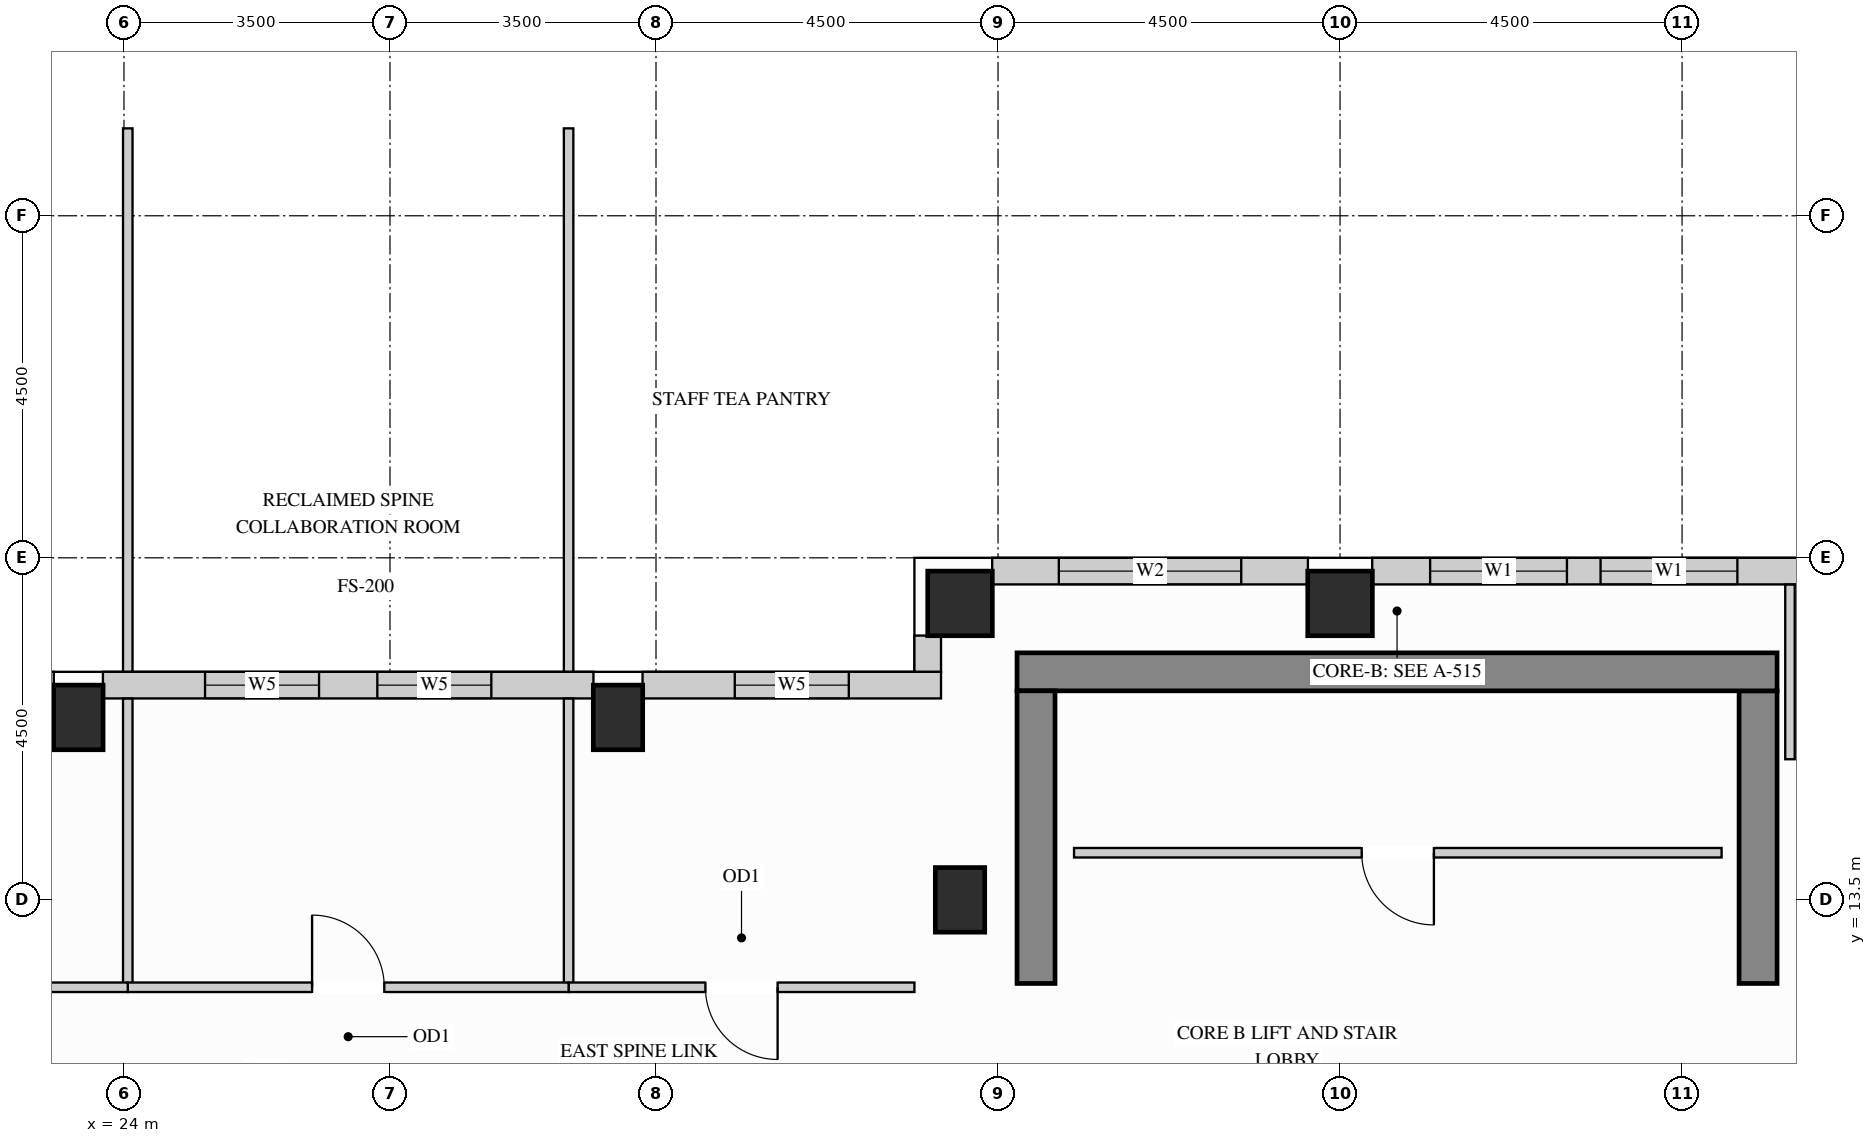
"""IFC4 building model, lengths in metres.
Left out: names, types, materials, properties, quantities, classifications, styles, units other than length and angle.
Written with IfcOpenShell. Run it as: python <this file> out.ifc"""

import sys

from ifc_helpers import new_model, si_unit, direction, frame, frame_2d, origin, origin_2d, place, context, subcontext, project, spatial, rectangle, extrude, source, transform, mapped, element, fill, save


model = new_model("IFC4")
c1 = context("Model", 3, precision=1e-05, world=origin(), true_north=direction((0.0, 1.0)))
c2 = subcontext(c1, "Body", "Model", "MODEL_VIEW")
j1 = project(units=[si_unit("LENGTHUNIT", "METRE"), si_unit("PLANEANGLEUNIT", "RADIAN")], contexts=[c1])
p1 = place(None, origin())
s1 = spatial("IfcSite", under=j1, at=p1, CompositionType="ELEMENT")
p2 = place(p1, origin())
s2 = spatial("IfcBuilding", under=s1, at=p2, CompositionType="ELEMENT")
p3 = place(p2, frame((0.0, 0.0, 234.0)))
s3 = spatial("IfcBuildingStorey", under=s2, at=p3, CompositionType="ELEMENT", Elevation=234.0)
m1 = source(origin(), c2, "Body", "SweptSolid", [
    extrude(rectangle(XDim=0.65, YDim=0.85, at=origin_2d()), origin(), (0.0, 0.0, 1.0), 3.4),
])
for number, where, z_axis, x_axis in (
    (1, (35.0, 13.5, 0.0), (0.0, 0.0, 1.0), (1.0, 0.0, 0.0)),
    (2, (23.4, 15.9, 0.0), (0.0, 0.0, 1.0), (1.0, 0.0, 0.0)),
    (3, (30.5, 15.9, 0.0), (0.0, 0.0, 1.0), (1.0, 0.0, 0.0)),
):
    element("IfcColumn", number, at=place(p3, frame(where, z_axis=z_axis, x_axis=x_axis)), inside=s3, PredefinedType="COLUMN", context=c2, shape_type="MappedRepresentation", body=[
        mapped(m1, transform((0.0, 0.0, 0.0), x_axis=(1.0, 0.0, 0.0), y_axis=(0.0, 1.0, 0.0), z_axis=(0.0, 0.0, 1.0))),
    ])
m2 = source(origin(), c2, "Body", "SweptSolid", [
    extrude(rectangle(XDim=0.85, YDim=0.85, at=origin_2d()), origin(), (0.0, 0.0, 1.0), 3.4),
])
for number, where, z_axis, x_axis in (
    (4, (35.0, 17.4, 0.0), (0.0, 0.0, 1.0), (1.0, 0.0, 0.0)),
    (5, (40.0, 17.4, 0.0), (0.0, 0.0, 1.0), (1.0, 0.0, 0.0)),
):
    element("IfcColumn", number, at=place(p3, frame(where, z_axis=z_axis, x_axis=x_axis)), inside=s3, PredefinedType="COLUMN", context=c2, shape_type="MappedRepresentation", body=[
        mapped(m2, transform((0.0, 0.0, 0.0), x_axis=(1.0, 0.0, 0.0), y_axis=(0.0, 1.0, 0.0), z_axis=(0.0, 0.0, 1.0))),
    ])
m3 = source(origin(), c2, "Body", "SweptSolid", [
    extrude(rectangle(XDim=3.85, YDim=0.5, at=frame_2d((1.925, 0.0))), origin(), (0.0, 0.0, 1.0), 3.4),
])
p4 = place(p3, frame((45.5, 12.4, 0.0), z_axis=(0.0, 0.0, 1.0), x_axis=(0.0, 1.0, 0.0)))
e6 = element("IfcWall", 6, at=p4, inside=s3, PredefinedType="SHEAR", context=c2, shape_type="MappedRepresentation", body=[
    mapped(m3, transform((0.0, 0.0, 0.0), x_axis=(1.0, 0.0, 0.0), y_axis=(0.0, 1.0, 0.0), z_axis=(0.0, 0.0, 1.0))),
])
m4 = source(origin(), c2, "Body", "SweptSolid", [
    extrude(rectangle(XDim=10.0, YDim=0.5, at=frame_2d((5.0, 0.0))), origin(), (0.0, 0.0, 1.0), 3.4),
])
p5 = place(p3, frame((35.75, 16.5, 0.0), z_axis=(0.0, 0.0, 1.0), x_axis=(1.0, 0.0, 0.0)))
e7 = element("IfcWall", 7, at=p5, inside=s3, PredefinedType="SHEAR", context=c2, shape_type="MappedRepresentation", body=[
    mapped(m4, transform((0.0, 0.0, 0.0), x_axis=(1.0, 0.0, 0.0), y_axis=(0.0, 1.0, 0.0), z_axis=(0.0, 0.0, 1.0))),
])
p6 = place(p3, frame((36.0, 12.4, 0.0), z_axis=(0.0, 0.0, 1.0), x_axis=(0.0, 1.0, 0.0)))
e8 = element("IfcWall", 8, at=p6, inside=s3, PredefinedType="SHEAR", context=c2, shape_type="MappedRepresentation", body=[
    mapped(m3, transform((0.0, 0.0, 0.0), x_axis=(1.0, 0.0, 0.0), y_axis=(0.0, 1.0, 0.0), z_axis=(0.0, 0.0, 1.0))),
])
p7 = place(p3, frame((47.5, 17.825, 0.0), z_axis=(0.0, 0.0, 1.0), x_axis=(-1.0, 0.0, 0.0)))
e9 = element("IfcWall", 9, at=p7, inside=s3, PredefinedType="SOLIDWALL", context=c2, shape_type="SweptSolid", body=[
    extrude(rectangle(XDim=7.077, YDim=0.35, at=frame_2d((3.539, 0.0))), origin(), (0.0, 0.0, 1.0), 3.385),
])
p8 = place(p7, frame((2.272, 0.0, 0.78)))
e10 = element("IfcOpeningElement", 10, at=p8, cuts=e9, PredefinedType="OPENING", context=c2, shape_type="SweptSolid", body=[
    extrude(rectangle(XDim=1.8, YDim=2.1, at=frame_2d((0.9, 1.05))), frame((0.0, 0.185, 0.0), z_axis=(0.0, -1.0, 0.0), x_axis=(1.0, 0.0, 0.0)), (0.0, 0.0, 1.0), 0.37),
])
p9 = place(p7, frame((4.515, 0.0, 0.78)))
e11 = element("IfcOpeningElement", 11, at=p9, cuts=e9, PredefinedType="OPENING", context=c2, shape_type="SweptSolid", body=[
    extrude(rectangle(XDim=1.8, YDim=2.1, at=frame_2d((0.9, 1.05))), frame((0.0, 0.185, 0.0), z_axis=(0.0, -1.0, 0.0), x_axis=(1.0, 0.0, 0.0)), (0.0, 0.0, 1.0), 0.37),
])
p10 = place(p3, frame((39.577, 17.825, 0.0), z_axis=(0.0, 0.0, 1.0), x_axis=(-1.0, 0.0, 0.0)))
e12 = element("IfcWall", 12, at=p10, inside=s3, PredefinedType="SOLIDWALL", context=c2, shape_type="SweptSolid", body=[
    extrude(rectangle(XDim=4.154, YDim=0.35, at=frame_2d((2.077, 0.0))), origin(), (0.0, 0.0, 1.0), 3.385),
])
p11 = place(p10, frame((0.877, 0.0, 0.78)))
e13 = element("IfcOpeningElement", 13, at=p11, cuts=e12, PredefinedType="OPENING", context=c2, shape_type="SweptSolid", body=[
    extrude(rectangle(XDim=2.4, YDim=2.1, at=frame_2d((1.2, 1.05))), frame((0.0, 0.185, 0.0), z_axis=(0.0, -1.0, 0.0), x_axis=(1.0, 0.0, 0.0)), (0.0, 0.0, 1.0), 0.37),
])
m5 = source(origin(), c2, "Body", "SweptSolid", [
    extrude(rectangle(XDim=0.479, YDim=0.35, at=frame_2d((0.24, 0.0))), origin(), (0.0, 0.0, 1.0), 3.385),
])
p12 = place(p3, frame((34.575, 16.977, 0.0), z_axis=(0.0, 0.0, 1.0), x_axis=(0.0, -1.0, 0.0)))
e14 = element("IfcWall", 14, at=p12, inside=s3, PredefinedType="SOLIDWALL", context=c2, shape_type="MappedRepresentation", body=[
    mapped(m5, transform((0.0, 0.0, 0.0), x_axis=(1.0, 0.0, 0.0), y_axis=(0.0, 1.0, 0.0), z_axis=(0.0, 0.0, 1.0))),
])
p13 = place(p3, frame((34.75, 16.325, 0.0), z_axis=(0.0, 0.0, 1.0), x_axis=(-1.0, 0.0, 0.0)))
e15 = element("IfcWall", 15, at=p13, inside=s3, PredefinedType="SOLIDWALL", context=c2, shape_type="SweptSolid", body=[
    extrude(rectangle(XDim=3.927, YDim=0.35, at=frame_2d((1.963, 0.0))), origin(), (0.0, 0.0, 1.0), 3.385),
])
p14 = place(p13, frame((1.213, 0.0, 0.78)))
e16 = element("IfcOpeningElement", 16, at=p14, cuts=e15, PredefinedType="OPENING", context=c2, shape_type="SweptSolid", body=[
    extrude(rectangle(XDim=1.5, YDim=2.0, at=frame_2d((0.75, 1.0))), frame((0.0, 0.185, 0.0), z_axis=(0.0, -1.0, 0.0), x_axis=(1.0, 0.0, 0.0)), (0.0, 0.0, 1.0), 0.37),
])
p15 = place(p3, frame((30.177, 16.325, 0.0), z_axis=(0.0, 0.0, 1.0), x_axis=(-1.0, 0.0, 0.0)))
e17 = element("IfcWall", 17, at=p15, inside=s3, PredefinedType="SOLIDWALL", context=c2, shape_type="SweptSolid", body=[
    extrude(rectangle(XDim=6.454, YDim=0.35, at=frame_2d((3.227, 0.0))), origin(), (0.0, 0.0, 1.0), 3.385),
])
p16 = place(p15, frame((1.344, 0.0, 0.78)))
e18 = element("IfcOpeningElement", 18, at=p16, cuts=e17, PredefinedType="OPENING", context=c2, shape_type="SweptSolid", body=[
    extrude(rectangle(XDim=1.5, YDim=2.0, at=frame_2d((0.75, 1.0))), frame((0.0, 0.185, 0.0), z_axis=(0.0, -1.0, 0.0), x_axis=(1.0, 0.0, 0.0)), (0.0, 0.0, 1.0), 0.37),
])
p17 = place(p15, frame((3.61, 0.0, 0.78)))
e19 = element("IfcOpeningElement", 19, at=p17, cuts=e17, PredefinedType="OPENING", context=c2, shape_type="SweptSolid", body=[
    extrude(rectangle(XDim=1.5, YDim=2.0, at=frame_2d((0.75, 1.0))), frame((0.0, 0.185, 0.0), z_axis=(0.0, -1.0, 0.0), x_axis=(1.0, 0.0, 0.0)), (0.0, 0.0, 1.0), 0.37),
])
p18 = place(p3, frame((23.077, 16.325, 0.0), z_axis=(0.0, 0.0, 1.0), x_axis=(-1.0, 0.0, 0.0)))
e20 = element("IfcWall", 20, at=p18, inside=s3, PredefinedType="SOLIDWALL", context=c2, shape_type="SweptSolid", body=[
    extrude(rectangle(XDim=3.927, YDim=0.35, at=frame_2d((1.963, 0.0))), origin(), (0.0, 0.0, 1.0), 3.385),
])
p19 = place(p18, frame((1.213, 0.0, 0.78)))
e21 = element("IfcOpeningElement", 21, at=p19, cuts=e20, PredefinedType="OPENING", context=c2, shape_type="SweptSolid", body=[
    extrude(rectangle(XDim=1.5, YDim=2.0, at=frame_2d((0.75, 1.0))), frame((0.0, 0.185, 0.0), z_axis=(0.0, -1.0, 0.0), x_axis=(1.0, 0.0, 0.0)), (0.0, 0.0, 1.0), 0.37),
])
p20 = place(p3, frame((36.5, 14.12, 0.0), z_axis=(0.0, 0.0, 1.0), x_axis=(1.0, 0.0, 0.0)))
e22 = element("IfcWall", 22, at=p20, inside=s3, PredefinedType="PARTITIONING", context=c2, shape_type="SweptSolid", body=[
    extrude(rectangle(XDim=8.52, YDim=0.125, at=frame_2d((4.26, 0.0))), origin(), (0.0, 0.0, 1.0), 3.385),
])
p21 = place(p20, frame((3.785, 0.0, 0.0)))
e23 = element("IfcOpeningElement", 23, at=p21, cuts=e22, PredefinedType="OPENING", context=c2, shape_type="SweptSolid", body=[
    extrude(rectangle(XDim=0.95, YDim=2.15, at=frame_2d((0.475, 1.075))), frame((0.0, 0.073, 0.0), z_axis=(0.0, -1.0, 0.0), x_axis=(1.0, 0.0, 0.0)), (0.0, 0.0, 1.0), 0.145),
])
m6 = source(origin(), c2, "Body", "SweptSolid", [
    extrude(rectangle(XDim=2.298, YDim=0.125, at=frame_2d((1.149, 0.0))), origin(), (0.0, 0.0, 1.0), 3.385),
])
p22 = place(p3, frame((45.92, 15.35, 0.0), z_axis=(0.0, 0.0, 1.0), x_axis=(0.0, 1.0, 0.0)))
e24 = element("IfcWall", 24, at=p22, inside=s3, PredefinedType="PARTITIONING", context=c2, shape_type="MappedRepresentation", body=[
    mapped(m6, transform((0.0, 0.0, 0.0), x_axis=(1.0, 0.0, 0.0), y_axis=(0.0, 1.0, 0.0), z_axis=(0.0, 0.0, 1.0))),
])
m7 = source(origin(), c2, "Body", "SweptSolid", [
    extrude(rectangle(XDim=3.798, YDim=0.125, at=frame_2d((1.899, 0.0))), origin(), (0.0, 0.0, 1.0), 3.385),
])
p23 = place(p3, frame((24.05, 12.35, 0.0), z_axis=(0.0, 0.0, 1.0), x_axis=(0.0, 1.0, 0.0)))
e25 = element("IfcWall", 25, at=p23, inside=s3, PredefinedType="PARTITIONING", context=c2, shape_type="MappedRepresentation", body=[
    mapped(m7, transform((0.0, 0.0, 0.0), x_axis=(1.0, 0.0, 0.0), y_axis=(0.0, 1.0, 0.0), z_axis=(0.0, 0.0, 1.0))),
])
m8 = source(origin(), c2, "Body", "SweptSolid", [
    extrude(rectangle(XDim=7.148, YDim=0.125, at=frame_2d((3.574, 0.0))), origin(), (0.0, 0.0, 1.0), 3.385),
])
p24 = place(p3, frame((24.05, 16.502, 0.0), z_axis=(0.0, 0.0, 1.0), x_axis=(0.0, 1.0, 0.0)))
e26 = element("IfcWall", 26, at=p24, inside=s3, PredefinedType="PARTITIONING", context=c2, shape_type="MappedRepresentation", body=[
    mapped(m8, transform((0.0, 0.0, 0.0), x_axis=(1.0, 0.0, 0.0), y_axis=(0.0, 1.0, 0.0), z_axis=(0.0, 0.0, 1.0))),
])
p25 = place(p3, frame((29.85, 12.35, 0.0), z_axis=(0.0, 0.0, 1.0), x_axis=(0.0, 1.0, 0.0)))
e27 = element("IfcWall", 27, at=p25, inside=s3, PredefinedType="PARTITIONING", context=c2, shape_type="MappedRepresentation", body=[
    mapped(m7, transform((0.0, 0.0, 0.0), x_axis=(1.0, 0.0, 0.0), y_axis=(0.0, 1.0, 0.0), z_axis=(0.0, 0.0, 1.0))),
])
p26 = place(p3, frame((29.85, 16.502, 0.0), z_axis=(0.0, 0.0, 1.0), x_axis=(0.0, 1.0, 0.0)))
e28 = element("IfcWall", 28, at=p26, inside=s3, PredefinedType="PARTITIONING", context=c2, shape_type="MappedRepresentation", body=[
    mapped(m8, transform((0.0, 0.0, 0.0), x_axis=(1.0, 0.0, 0.0), y_axis=(0.0, 1.0, 0.0), z_axis=(0.0, 0.0, 1.0))),
])
p27 = place(p3, frame((29.85, 12.35, 0.0), z_axis=(0.0, 0.0, 1.0), x_axis=(1.0, 0.0, 0.0)))
e29 = element("IfcWall", 29, at=p27, inside=s3, PredefinedType="PARTITIONING", context=c2, shape_type="SweptSolid", body=[
    extrude(rectangle(XDim=4.55, YDim=0.125, at=frame_2d((2.275, 0.0))), origin(), (0.0, 0.0, 1.0), 3.385),
])
p28 = place(p27, frame((1.8, 0.0, 0.0)))
e30 = element("IfcOpeningElement", 30, at=p28, cuts=e29, PredefinedType="OPENING", context=c2, shape_type="SweptSolid", body=[
    extrude(rectangle(XDim=0.95, YDim=2.15, at=frame_2d((0.475, 1.075))), frame((0.0, 0.073, 0.0), z_axis=(0.0, -1.0, 0.0), x_axis=(1.0, 0.0, 0.0)), (0.0, 0.0, 1.0), 0.145),
])
p29 = place(p3, frame((24.05, 12.35, 0.0), z_axis=(0.0, 0.0, 1.0), x_axis=(1.0, 0.0, 0.0)))
e31 = element("IfcWall", 31, at=p29, inside=s3, PredefinedType="PARTITIONING", context=c2, shape_type="SweptSolid", body=[
    extrude(rectangle(XDim=5.8, YDim=0.125, at=frame_2d((2.9, 0.0))), origin(), (0.0, 0.0, 1.0), 3.385),
])
p30 = place(p29, frame((2.425, 0.0, 0.0)))
e32 = element("IfcOpeningElement", 32, at=p30, cuts=e31, PredefinedType="OPENING", context=c2, shape_type="SweptSolid", body=[
    extrude(rectangle(XDim=0.95, YDim=2.15, at=frame_2d((0.475, 1.075))), frame((0.0, 0.073, 0.0), z_axis=(0.0, -1.0, 0.0), x_axis=(1.0, 0.0, 0.0)), (0.0, 0.0, 1.0), 0.145),
])
p31 = place(p3, frame((19.5, 12.35, 0.0), z_axis=(0.0, 0.0, 1.0), x_axis=(1.0, 0.0, 0.0)))
e33 = element("IfcWall", 33, at=p31, inside=s3, PredefinedType="PARTITIONING", context=c2, shape_type="SweptSolid", body=[
    extrude(rectangle(XDim=4.55, YDim=0.125, at=frame_2d((2.275, 0.0))), origin(), (0.0, 0.0, 1.0), 3.385),
])
p32 = place(p31, frame((1.8, 0.0, 0.0)))
e34 = element("IfcOpeningElement", 34, at=p32, cuts=e33, PredefinedType="OPENING", context=c2, shape_type="SweptSolid", body=[
    extrude(rectangle(XDim=0.95, YDim=2.15, at=frame_2d((0.475, 1.075))), frame((0.0, 0.073, 0.0), z_axis=(0.0, -1.0, 0.0), x_axis=(1.0, 0.0, 0.0)), (0.0, 0.0, 1.0), 0.145),
])
m9 = source(origin(), c2, "Body", "SweptSolid", [
    extrude(rectangle(XDim=0.95, YDim=2.15, at=frame_2d((0.475, 1.075))), frame((0.0, 0.025, 0.0), z_axis=(0.0, -1.0, 0.0), x_axis=(1.0, 0.0, 0.0)), (0.0, 0.0, 1.0), 0.05),
])
p33 = place(p21, origin())
e35 = element("IfcDoor", 35, at=p33, inside=s3, OperationType="SINGLE_SWING_RIGHT", PredefinedType="DOOR", context=c2, shape_type="MappedRepresentation", body=[
    mapped(m9, transform((0.0, 0.0, 0.0), x_axis=(1.0, 0.0, 0.0), y_axis=(0.0, 1.0, 0.0), z_axis=(0.0, 0.0, 1.0))),
])
fill(e23, e35)
p34 = place(p30, origin())
e36 = element("IfcDoor", 36, at=p34, inside=s3, OperationType="SINGLE_SWING_LEFT", PredefinedType="DOOR", context=c2, shape_type="MappedRepresentation", body=[
    mapped(m9, transform((0.0, 0.0, 0.0), x_axis=(1.0, 0.0, 0.0), y_axis=(0.0, 1.0, 0.0), z_axis=(0.0, 0.0, 1.0))),
])
fill(e32, e36)
p35 = place(p28, origin())
e37 = element("IfcDoor", 37, at=p35, inside=s3, OperationType="SINGLE_SWING_RIGHT", PredefinedType="DOOR", context=c2, shape_type="MappedRepresentation", body=[
    mapped(m9, transform((0.0, 0.0, 0.0), x_axis=(1.0, 0.0, 0.0), y_axis=(0.0, 1.0, 0.0), z_axis=(0.0, 0.0, 1.0))),
])
fill(e30, e37)
m10 = source(origin(), c2, "Body", "SweptSolid", [
    extrude(rectangle(XDim=1.8, YDim=2.1, at=frame_2d((0.9, 1.05))), frame((0.0, 0.03, 0.0), z_axis=(0.0, -1.0, 0.0), x_axis=(1.0, 0.0, 0.0)), (0.0, 0.0, 1.0), 0.06),
])
p36 = place(p8, origin())
e38 = element("IfcWindow", 38, at=p36, inside=s3, PartitioningType="SINGLE_PANEL", PredefinedType="WINDOW", context=c2, shape_type="MappedRepresentation", body=[
    mapped(m10, transform((0.0, 0.0, 0.0), x_axis=(1.0, 0.0, 0.0), y_axis=(0.0, 1.0, 0.0), z_axis=(0.0, 0.0, 1.0))),
])
fill(e10, e38)
p37 = place(p9, origin())
e39 = element("IfcWindow", 39, at=p37, inside=s3, PartitioningType="SINGLE_PANEL", PredefinedType="WINDOW", context=c2, shape_type="MappedRepresentation", body=[
    mapped(m10, transform((0.0, 0.0, 0.0), x_axis=(1.0, 0.0, 0.0), y_axis=(0.0, 1.0, 0.0), z_axis=(0.0, 0.0, 1.0))),
])
fill(e11, e39)
m11 = source(origin(), c2, "Body", "SweptSolid", [
    extrude(rectangle(XDim=2.4, YDim=2.1, at=frame_2d((1.2, 1.05))), frame((0.0, 0.03, 0.0), z_axis=(0.0, -1.0, 0.0), x_axis=(1.0, 0.0, 0.0)), (0.0, 0.0, 1.0), 0.06),
])
p38 = place(p11, origin())
e40 = element("IfcWindow", 40, at=p38, inside=s3, PartitioningType="SINGLE_PANEL", PredefinedType="WINDOW", context=c2, shape_type="MappedRepresentation", body=[
    mapped(m11, transform((0.0, 0.0, 0.0), x_axis=(1.0, 0.0, 0.0), y_axis=(0.0, 1.0, 0.0), z_axis=(0.0, 0.0, 1.0))),
])
fill(e13, e40)
m12 = source(origin(), c2, "Body", "SweptSolid", [
    extrude(rectangle(XDim=1.5, YDim=2.0, at=frame_2d((0.75, 1.0))), frame((0.0, 0.03, 0.0), z_axis=(0.0, -1.0, 0.0), x_axis=(1.0, 0.0, 0.0)), (0.0, 0.0, 1.0), 0.06),
])
p39 = place(p14, origin())
e41 = element("IfcWindow", 41, at=p39, inside=s3, PartitioningType="SINGLE_PANEL", PredefinedType="WINDOW", context=c2, shape_type="MappedRepresentation", body=[
    mapped(m12, transform((0.0, 0.0, 0.0), x_axis=(1.0, 0.0, 0.0), y_axis=(0.0, 1.0, 0.0), z_axis=(0.0, 0.0, 1.0))),
])
fill(e16, e41)
p40 = place(p16, origin())
e42 = element("IfcWindow", 42, at=p40, inside=s3, PartitioningType="SINGLE_PANEL", PredefinedType="WINDOW", context=c2, shape_type="MappedRepresentation", body=[
    mapped(m12, transform((0.0, 0.0, 0.0), x_axis=(1.0, 0.0, 0.0), y_axis=(0.0, 1.0, 0.0), z_axis=(0.0, 0.0, 1.0))),
])
fill(e18, e42)
p41 = place(p17, origin())
e43 = element("IfcWindow", 43, at=p41, inside=s3, PartitioningType="SINGLE_PANEL", PredefinedType="WINDOW", context=c2, shape_type="MappedRepresentation", body=[
    mapped(m12, transform((0.0, 0.0, 0.0), x_axis=(1.0, 0.0, 0.0), y_axis=(0.0, 1.0, 0.0), z_axis=(0.0, 0.0, 1.0))),
])
fill(e19, e43)
save(model, sys.argv[1])
